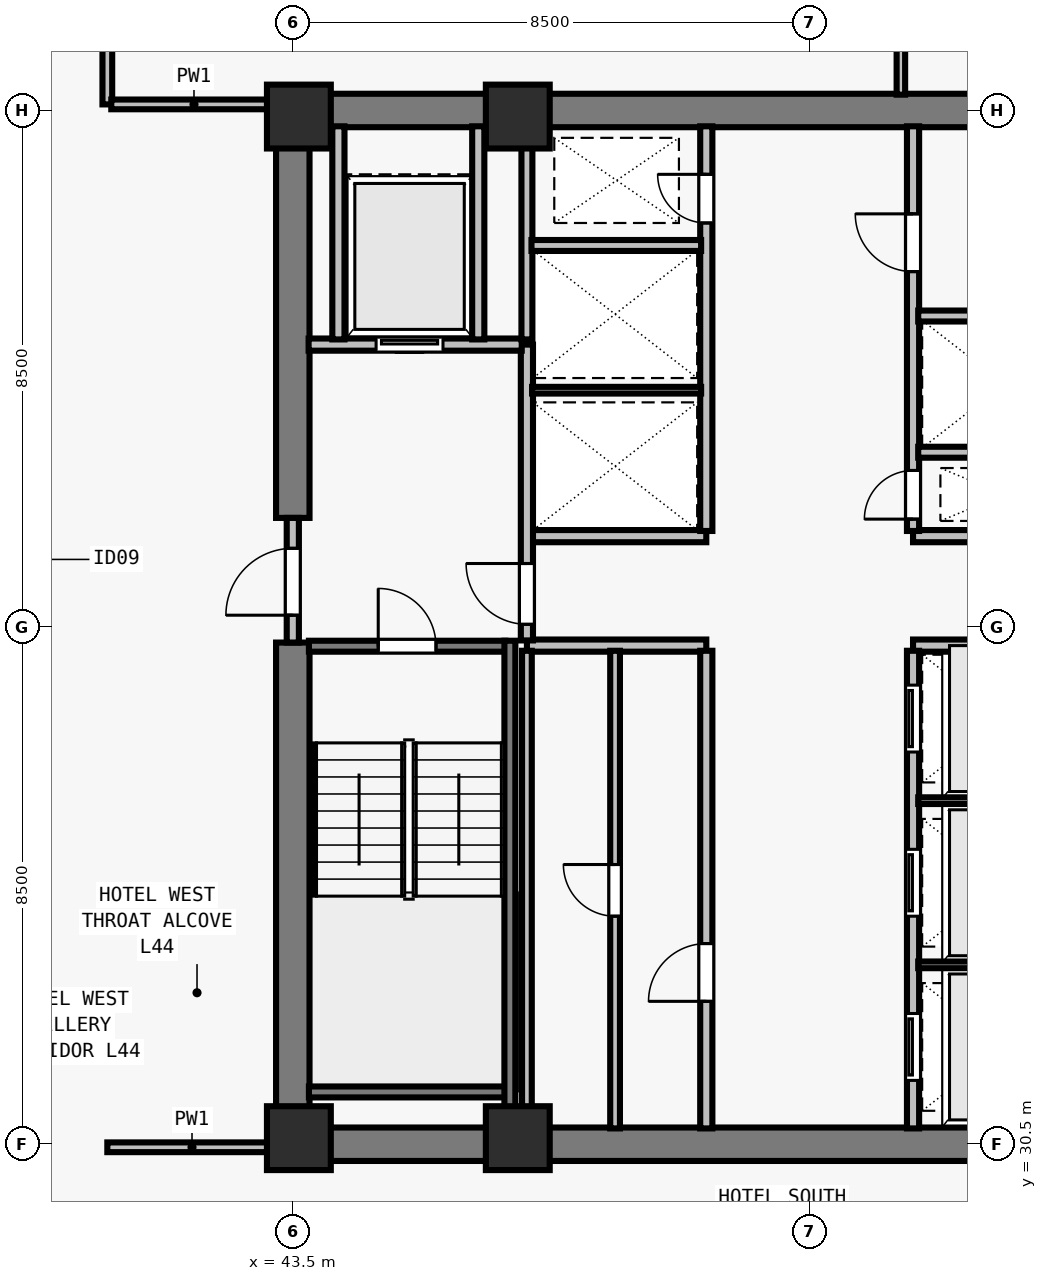
"""IFC4 building model, lengths in metres.
Left out: names, types, materials, properties, quantities, classifications, styles, units other than length and angle.
Written with IfcOpenShell. Run it as: python <this file> out.ifc"""

import sys

from ifc_helpers import new_model, si_unit, direction, frame, frame_2d, origin, origin_2d, place, context, subcontext, project, spatial, rectangle, extrude, element, fill, save


model = new_model("IFC4")
c1 = context("Model", 3, precision=1e-05, world=origin(), true_north=direction((0.0, 1.0)))
c2 = subcontext(c1, "Body", "Model", "MODEL_VIEW")
j1 = project(units=[si_unit("LENGTHUNIT", "METRE"), si_unit("PLANEANGLEUNIT", "RADIAN")], contexts=[c1])
p1 = place(None, origin())
s1 = spatial("IfcSite", under=j1, at=p1, CompositionType="ELEMENT")
p2 = place(p1, origin())
s2 = spatial("IfcBuilding", under=s1, at=p2, CompositionType="ELEMENT")
p3 = place(p2, frame((0.0, 0.0, 162.0)))
s3 = spatial("IfcBuildingStorey", under=s2, at=p3, CompositionType="ELEMENT", Elevation=162.0)
for number, where, z_axis, x_axis in (
    (1, (43.6, 30.6, 0.0), (0.0, 0.0, 1.0), (1.0, 0.0, 0.0)),
    (2, (47.2, 30.6, 0.0), (0.0, 0.0, 1.0), (1.0, 0.0, 0.0)),
    (3, (43.6, 47.4, 0.0), (0.0, 0.0, 1.0), (1.0, 0.0, 0.0)),
    (4, (47.2, 47.4, 0.0), (0.0, 0.0, 1.0), (1.0, 0.0, 0.0)),
):
    element("IfcColumn", number, at=place(p3, frame(where, z_axis=z_axis, x_axis=x_axis)), inside=s3, PredefinedType="COLUMN", context=c2, shape_type="SweptSolid", body=[
        extrude(rectangle(XDim=1.05, YDim=1.05, at=origin_2d()), origin(), (0.0, 0.0, 1.0), 3.5),
    ])
for number, where, z_axis, x_axis in (
    (5, (43.225, 30.5, 0.0), (0.0, 0.0, 1.0), (1.0, 0.0, 0.0)),
    (6, (43.225, 47.5, 0.0), (0.0, 0.0, 1.0), (1.0, 0.0, 0.0)),
):
    element("IfcWall", number, at=place(p3, frame(where, z_axis=z_axis, x_axis=x_axis)), inside=s3, PredefinedType="SHEAR", context=c2, shape_type="SweptSolid", body=[
        extrude(rectangle(XDim=17.55, YDim=0.55, at=frame_2d((8.775, 0.0))), origin(), (0.0, 0.0, 1.0), 3.28),
    ])
p4 = place(p3, frame((43.5, 30.765, 0.0), z_axis=(0.0, 0.0, 1.0), x_axis=(0.0, 1.0, 0.0)))
e7 = element("IfcWall", 7, at=p4, inside=s3, PredefinedType="SHEAR", context=c2, shape_type="SweptSolid", body=[
    extrude(rectangle(XDim=7.985, YDim=0.55, at=frame_2d((3.993, 0.0))), origin(), (0.0, 0.0, 1.0), 3.28),
])
p5 = place(p3, frame((43.5, 40.8, 0.0), z_axis=(0.0, 0.0, 1.0), x_axis=(0.0, 1.0, 0.0)))
e8 = element("IfcWall", 8, at=p5, inside=s3, PredefinedType="SHEAR", context=c2, shape_type="SweptSolid", body=[
    extrude(rectangle(XDim=6.435, YDim=0.55, at=frame_2d((3.218, 0.0))), origin(), (0.0, 0.0, 1.0), 3.28),
])
for number, where, z_axis, x_axis in (
    (9, (47.35, 38.7, 0.0), (0.0, 0.0, 1.0), (1.0, 0.0, 0.0)),
    (10, (47.35, 40.5, 0.0), (0.0, 0.0, 1.0), (1.0, 0.0, 0.0)),
    (11, (53.7, 38.7, 0.0), (0.0, 0.0, 1.0), (1.0, 0.0, 0.0)),
    (12, (53.7, 40.5, 0.0), (0.0, 0.0, 1.0), (1.0, 0.0, 0.0)),
):
    element("IfcWall", number, at=place(p3, frame(where, z_axis=z_axis, x_axis=x_axis)), inside=s3, PredefinedType="SOLIDWALL", context=c2, shape_type="SweptSolid", body=[
        extrude(rectangle(XDim=2.95, YDim=0.2, at=frame_2d((1.475, 0.0))), origin(), (0.0, 0.0, 1.0), 3.28),
    ])
p6 = place(p3, frame((50.3, 30.76, 0.0), z_axis=(0.0, 0.0, 1.0), x_axis=(0.0, 1.0, 0.0)))
e13 = element("IfcWall", 13, at=p6, inside=s3, PredefinedType="SOLIDWALL", context=c2, shape_type="SweptSolid", body=[
    extrude(rectangle(XDim=7.855, YDim=0.2, at=frame_2d((3.927, 0.0))), origin(), (0.0, 0.0, 1.0), 3.28),
])
p7 = place(p6, frame((2.09, 0.0, 0.0)))
e14 = element("IfcOpeningElement", 14, at=p7, cuts=e13, PredefinedType="OPENING", context=c2, shape_type="SweptSolid", body=[
    extrude(rectangle(XDim=0.95, YDim=2.12, at=frame_2d((0.475, 1.06))), frame((0.0, 0.11, 0.0), z_axis=(0.0, -1.0, 0.0), x_axis=(1.0, 0.0, 0.0)), (0.0, 0.0, 1.0), 0.22),
])
p8 = place(p3, frame((53.7, 30.76, 0.0), z_axis=(0.0, 0.0, 1.0), x_axis=(0.0, 1.0, 0.0)))
e15 = element("IfcWall", 15, at=p8, inside=s3, PredefinedType="SOLIDWALL", context=c2, shape_type="SweptSolid", body=[
    extrude(rectangle(XDim=7.855, YDim=0.2, at=frame_2d((3.927, 0.0))), origin(), (0.0, 0.0, 1.0), 3.28),
])
p9 = place(p8, frame((0.79, 0.0, 0.0)))
e16 = element("IfcOpeningElement", 16, at=p9, cuts=e15, PredefinedType="OPENING", context=c2, shape_type="SweptSolid", body=[
    extrude(rectangle(XDim=1.1, YDim=2.2, at=frame_2d((0.55, 1.1))), frame((0.0, 0.11, 0.0), z_axis=(0.0, -1.0, 0.0), x_axis=(1.0, 0.0, 0.0)), (0.0, 0.0, 1.0), 0.22),
])
p10 = place(p8, frame((3.49, 0.0, 0.0)))
e17 = element("IfcOpeningElement", 17, at=p10, cuts=e15, PredefinedType="OPENING", context=c2, shape_type="SweptSolid", body=[
    extrude(rectangle(XDim=1.1, YDim=2.2, at=frame_2d((0.55, 1.1))), frame((0.0, 0.11, 0.0), z_axis=(0.0, -1.0, 0.0), x_axis=(1.0, 0.0, 0.0)), (0.0, 0.0, 1.0), 0.22),
])
p11 = place(p8, frame((6.19, 0.0, 0.0)))
e18 = element("IfcOpeningElement", 18, at=p11, cuts=e15, PredefinedType="OPENING", context=c2, shape_type="SweptSolid", body=[
    extrude(rectangle(XDim=1.1, YDim=2.2, at=frame_2d((0.55, 1.1))), frame((0.0, 0.11, 0.0), z_axis=(0.0, -1.0, 0.0), x_axis=(1.0, 0.0, 0.0)), (0.0, 0.0, 1.0), 0.22),
])
p12 = place(p3, frame((50.3, 40.585, 0.0), z_axis=(0.0, 0.0, 1.0), x_axis=(0.0, 1.0, 0.0)))
e19 = element("IfcWall", 19, at=p12, inside=s3, PredefinedType="SOLIDWALL", context=c2, shape_type="SweptSolid", body=[
    extrude(rectangle(XDim=6.655, YDim=0.2, at=frame_2d((3.328, 0.0))), origin(), (0.0, 0.0, 1.0), 3.28),
])
p13 = place(p12, frame((5.065, 0.0, 0.0)))
e20 = element("IfcOpeningElement", 20, at=p13, cuts=e19, PredefinedType="OPENING", context=c2, shape_type="SweptSolid", body=[
    extrude(rectangle(XDim=0.8, YDim=2.08, at=frame_2d((0.4, 1.04))), frame((0.0, 0.11, 0.0), z_axis=(0.0, -1.0, 0.0), x_axis=(1.0, 0.0, 0.0)), (0.0, 0.0, 1.0), 0.22),
])
p14 = place(p3, frame((53.7, 40.585, 0.0), z_axis=(0.0, 0.0, 1.0), x_axis=(0.0, 1.0, 0.0)))
e21 = element("IfcWall", 21, at=p14, inside=s3, PredefinedType="SOLIDWALL", context=c2, shape_type="SweptSolid", body=[
    extrude(rectangle(XDim=6.655, YDim=0.2, at=frame_2d((3.328, 0.0))), origin(), (0.0, 0.0, 1.0), 3.28),
])
p15 = place(p14, frame((0.195, 0.0, 0.0)))
e22 = element("IfcOpeningElement", 22, at=p15, cuts=e21, PredefinedType="OPENING", context=c2, shape_type="SweptSolid", body=[
    extrude(rectangle(XDim=0.8, YDim=2.08, at=frame_2d((0.4, 1.04))), frame((0.0, 0.11, 0.0), z_axis=(0.0, -1.0, 0.0), x_axis=(1.0, 0.0, 0.0)), (0.0, 0.0, 1.0), 0.22),
])
p16 = place(p14, frame((4.265, 0.0, 0.0)))
e23 = element("IfcOpeningElement", 23, at=p16, cuts=e21, PredefinedType="OPENING", context=c2, shape_type="SweptSolid", body=[
    extrude(rectangle(XDim=0.95, YDim=2.12, at=frame_2d((0.475, 1.06))), frame((0.0, 0.11, 0.0), z_axis=(0.0, -1.0, 0.0), x_axis=(1.0, 0.0, 0.0)), (0.0, 0.0, 1.0), 0.22),
])
p17 = place(p3, frame((43.5, 38.75, 0.0), z_axis=(0.0, 0.0, 1.0), x_axis=(0.0, 1.0, 0.0)))
e24 = element("IfcWall", 24, at=p17, inside=s3, PredefinedType="SOLIDWALL", context=c2, shape_type="SweptSolid", body=[
    extrude(rectangle(XDim=2.05, YDim=0.2, at=frame_2d((1.025, 0.0))), origin(), (0.0, 0.0, 1.0), 3.28),
])
p18 = place(p17, frame((0.45, 0.0, 0.0)))
e25 = element("IfcOpeningElement", 25, at=p18, cuts=e24, PredefinedType="OPENING", context=c2, shape_type="SweptSolid", body=[
    extrude(rectangle(XDim=1.1, YDim=2.15, at=frame_2d((0.55, 1.075))), frame((0.0, 0.11, 0.0), z_axis=(0.0, -1.0, 0.0), x_axis=(1.0, 0.0, 0.0)), (0.0, 0.0, 1.0), 0.22),
])
p19 = place(p3, frame((47.35, 38.785, 0.0), z_axis=(0.0, 0.0, 1.0), x_axis=(0.0, 1.0, 0.0)))
e26 = element("IfcWall", 26, at=p19, inside=s3, PredefinedType="SOLIDWALL", context=c2, shape_type="SweptSolid", body=[
    extrude(rectangle(XDim=4.865, YDim=0.2, at=frame_2d((2.433, 0.0))), origin(), (0.0, 0.0, 1.0), 3.28),
])
p20 = place(p19, frame((0.265, 0.0, 0.0)))
e27 = element("IfcOpeningElement", 27, at=p20, cuts=e26, PredefinedType="OPENING", context=c2, shape_type="SweptSolid", body=[
    extrude(rectangle(XDim=1.0, YDim=2.15, at=frame_2d((0.5, 1.075))), frame((0.0, 0.11, 0.0), z_axis=(0.0, -1.0, 0.0), x_axis=(1.0, 0.0, 0.0)), (0.0, 0.0, 1.0), 0.22),
])
p21 = place(p3, frame((43.76, 43.65, 0.0), z_axis=(0.0, 0.0, 1.0), x_axis=(1.0, 0.0, 0.0)))
e28 = element("IfcWall", 28, at=p21, inside=s3, PredefinedType="SOLIDWALL", context=c2, shape_type="SweptSolid", body=[
    extrude(rectangle(XDim=3.505, YDim=0.2, at=frame_2d((1.752, 0.0))), origin(), (0.0, 0.0, 1.0), 3.28),
])
p22 = place(p21, frame((1.11, 0.0, 0.0)))
e29 = element("IfcOpeningElement", 29, at=p22, cuts=e28, PredefinedType="OPENING", context=c2, shape_type="SweptSolid", body=[
    extrude(rectangle(XDim=1.1, YDim=2.2, at=frame_2d((0.55, 1.1))), frame((0.0, 0.11, 0.0), z_axis=(0.0, -1.0, 0.0), x_axis=(1.0, 0.0, 0.0)), (0.0, 0.0, 1.0), 0.22),
])
for number, where, z_axis, x_axis in (
    (30, (46.55, 43.735, 0.0), (0.0, 0.0, 1.0), (0.0, 1.0, 0.0)),
    (31, (44.25, 43.735, 0.0), (0.0, 0.0, 1.0), (0.0, 1.0, 0.0)),
):
    element("IfcWall", number, at=place(p3, frame(where, z_axis=z_axis, x_axis=x_axis)), inside=s3, PredefinedType="SOLIDWALL", context=c2, shape_type="SweptSolid", body=[
        extrude(rectangle(XDim=3.505, YDim=0.2, at=frame_2d((1.752, 0.0))), origin(), (0.0, 0.0, 1.0), 3.28),
    ])
p23 = place(p3, frame((47.35, 30.76, 0.0), z_axis=(0.0, 0.0, 1.0), x_axis=(0.0, 1.0, 0.0)))
e32 = element("IfcWall", 32, at=p23, inside=s3, PredefinedType="PARTITIONING", context=c2, shape_type="SweptSolid", body=[
    extrude(rectangle(XDim=7.855, YDim=0.16, at=frame_2d((3.927, 0.0))), origin(), (0.0, 0.0, 1.0), 3.28),
])
p24 = place(p3, frame((48.8, 30.76, 0.0), z_axis=(0.0, 0.0, 1.0), x_axis=(0.0, 1.0, 0.0)))
e33 = element("IfcWall", 33, at=p24, inside=s3, PredefinedType="PARTITIONING", context=c2, shape_type="SweptSolid", body=[
    extrude(rectangle(XDim=7.855, YDim=0.16, at=frame_2d((3.927, 0.0))), origin(), (0.0, 0.0, 1.0), 3.28),
])
p25 = place(p24, frame((3.49, 0.0, 0.0)))
e34 = element("IfcOpeningElement", 34, at=p25, cuts=e33, PredefinedType="OPENING", context=c2, shape_type="SweptSolid", body=[
    extrude(rectangle(XDim=0.85, YDim=2.12, at=frame_2d((0.425, 1.06))), frame((0.0, 0.09, 0.0), z_axis=(0.0, -1.0, 0.0), x_axis=(1.0, 0.0, 0.0)), (0.0, 0.0, 1.0), 0.18),
])
for number, where, z_axis, x_axis in (
    (35, (53.785, 33.45, 0.0), (0.0, 0.0, 1.0), (1.0, 0.0, 0.0)),
    (36, (53.785, 36.15, 0.0), (0.0, 0.0, 1.0), (1.0, 0.0, 0.0)),
):
    element("IfcWall", number, at=place(p3, frame(where, z_axis=z_axis, x_axis=x_axis)), inside=s3, PredefinedType="PARTITIONING", context=c2, shape_type="SweptSolid", body=[
        extrude(rectangle(XDim=2.79, YDim=0.11, at=frame_2d((1.395, 0.0))), origin(), (0.0, 0.0, 1.0), 3.28),
    ])
p26 = place(p3, frame((47.35, 43.735, 0.0), z_axis=(0.0, 0.0, 1.0), x_axis=(0.0, 1.0, 0.0)))
e37 = element("IfcWall", 37, at=p26, inside=s3, PredefinedType="SOLIDWALL", context=c2, shape_type="SweptSolid", body=[
    extrude(rectangle(XDim=3.505, YDim=0.18, at=frame_2d((1.752, 0.0))), origin(), (0.0, 0.0, 1.0), 3.28),
])
p27 = place(p3, frame((47.435, 42.9, 0.0), z_axis=(0.0, 0.0, 1.0), x_axis=(1.0, 0.0, 0.0)))
e38 = element("IfcWall", 38, at=p27, inside=s3, PredefinedType="PARTITIONING", context=c2, shape_type="SweptSolid", body=[
    extrude(rectangle(XDim=2.78, YDim=0.11, at=frame_2d((1.39, 0.0))), origin(), (0.0, 0.0, 1.0), 3.28),
])
p28 = place(p3, frame((47.425, 45.28, 0.0), z_axis=(0.0, 0.0, 1.0), x_axis=(1.0, 0.0, 0.0)))
e39 = element("IfcWall", 39, at=p28, inside=s3, PredefinedType="SOLIDWALL", context=c2, shape_type="SweptSolid", body=[
    extrude(rectangle(XDim=2.79, YDim=0.18, at=frame_2d((1.395, 0.0))), origin(), (0.0, 0.0, 1.0), 3.28),
])
p29 = place(p3, frame((53.785, 41.88, 0.0), z_axis=(0.0, 0.0, 1.0), x_axis=(1.0, 0.0, 0.0)))
e40 = element("IfcWall", 40, at=p29, inside=s3, PredefinedType="SOLIDWALL", context=c2, shape_type="SweptSolid", body=[
    extrude(rectangle(XDim=2.78, YDim=0.18, at=frame_2d((1.39, 0.0))), origin(), (0.0, 0.0, 1.0), 3.28),
])
p30 = place(p3, frame((53.785, 44.12, 0.0), z_axis=(0.0, 0.0, 1.0), x_axis=(1.0, 0.0, 0.0)))
e41 = element("IfcWall", 41, at=p30, inside=s3, PredefinedType="SOLIDWALL", context=c2, shape_type="SweptSolid", body=[
    extrude(rectangle(XDim=2.79, YDim=0.18, at=frame_2d((1.395, 0.0))), origin(), (0.0, 0.0, 1.0), 3.28),
])
p31 = place(p3, frame((40.45, 47.6, 0.0), z_axis=(0.0, 0.0, 1.0), x_axis=(0.0, 1.0, 0.0)))
e42 = element("IfcWall", 42, at=p31, inside=s3, PredefinedType="PARTITIONING", context=c2, shape_type="SweptSolid", body=[
    extrude(rectangle(XDim=15.075, YDim=0.16, at=frame_2d((7.538, 0.0))), origin(), (0.0, 0.0, 1.0), 2.555),
])
p32 = place(p31, frame((3.5, 0.0, 0.0)))
e43 = element("IfcOpeningElement", 43, at=p32, cuts=e42, PredefinedType="OPENING", context=c2, shape_type="SweptSolid", body=[
    extrude(rectangle(XDim=0.96, YDim=2.12, at=frame_2d((0.48, 1.06))), frame((0.0, 0.09, 0.0), z_axis=(0.0, -1.0, 0.0), x_axis=(1.0, 0.0, 0.0)), (0.0, 0.0, 1.0), 0.18),
])
p33 = place(p3, frame((40.45, 30.45, 0.0), z_axis=(0.0, 0.0, 1.0), x_axis=(1.0, 0.0, 0.0)))
e44 = element("IfcWall", 44, at=p33, inside=s3, PredefinedType="PARTITIONING", context=c2, shape_type="SweptSolid", body=[
    extrude(rectangle(XDim=2.785, YDim=0.16, at=frame_2d((1.393, 0.0))), origin(), (0.0, 0.0, 1.0), 3.28),
])
p34 = place(p3, frame((40.515, 47.6, 0.0), z_axis=(0.0, 0.0, 1.0), x_axis=(1.0, 0.0, 0.0)))
e45 = element("IfcWall", 45, at=p34, inside=s3, PredefinedType="PARTITIONING", context=c2, shape_type="SweptSolid", body=[
    extrude(rectangle(XDim=2.72, YDim=0.16, at=frame_2d((1.36, 0.0))), origin(), (0.0, 0.0, 1.0), 3.28),
])
p35 = place(p3, frame((53.5, 47.76, 0.0), z_axis=(0.0, 0.0, 1.0), x_axis=(0.0, 1.0, 0.0)))
e46 = element("IfcWall", 46, at=p35, inside=s3, PredefinedType="PARTITIONING", context=c2, shape_type="SweptSolid", body=[
    extrude(rectangle(XDim=14.915, YDim=0.14, at=frame_2d((7.458, 0.0))), origin(), (0.0, 0.0, 1.0), 2.896),
])
p36 = place(p3, frame((43.765, 38.69, 0.0), z_axis=(0.0, 0.0, 1.0), x_axis=(1.0, 0.0, 0.0)))
e47 = element("IfcWall", 47, at=p36, inside=s3, PredefinedType="SOLIDWALL", context=c2, shape_type="SweptSolid", body=[
    extrude(rectangle(XDim=3.23, YDim=0.18, at=frame_2d((1.615, 0.0))), origin(), (0.0, 0.0, 1.0), 3.28),
])
p37 = place(p36, frame((1.14, 0.0, 0.0)))
e48 = element("IfcOpeningElement", 48, at=p37, cuts=e47, PredefinedType="OPENING", context=c2, shape_type="SweptSolid", body=[
    extrude(rectangle(XDim=0.95, YDim=2.15, at=frame_2d((0.475, 1.075))), frame((0.0, 0.1, 0.0), z_axis=(0.0, -1.0, 0.0), x_axis=(1.0, 0.0, 0.0)), (0.0, 0.0, 1.0), 0.2),
])
p38 = place(p3, frame((43.765, 31.36, 0.0), z_axis=(0.0, 0.0, 1.0), x_axis=(1.0, 0.0, 0.0)))
e49 = element("IfcWall", 49, at=p38, inside=s3, PredefinedType="SOLIDWALL", context=c2, shape_type="SweptSolid", body=[
    extrude(rectangle(XDim=3.23, YDim=0.18, at=frame_2d((1.615, 0.0))), origin(), (0.0, 0.0, 1.0), 3.28),
])
p39 = place(p3, frame((47.07, 38.78, 0.0), z_axis=(0.0, 0.0, 1.0), x_axis=(0.0, -1.0, 0.0)))
e50 = element("IfcWall", 50, at=p39, inside=s3, PredefinedType="SOLIDWALL", context=c2, shape_type="SweptSolid", body=[
    extrude(rectangle(XDim=8.017, YDim=0.18, at=frame_2d((4.009, 0.0))), origin(), (0.0, 0.0, 1.0), 3.28),
])
p40 = place(p18, origin())
e51 = element("IfcDoor", 51, at=p40, inside=s3, OperationType="SINGLE_SWING_LEFT", PredefinedType="DOOR", context=c2, shape_type="SweptSolid", body=[
    extrude(rectangle(XDim=1.1, YDim=2.15, at=frame_2d((0.55, 1.075))), frame((0.0, 0.025, 0.0), z_axis=(0.0, -1.0, 0.0), x_axis=(1.0, 0.0, 0.0)), (0.0, 0.0, 1.0), 0.05),
])
fill(e25, e51)
p41 = place(p20, origin())
e52 = element("IfcDoor", 52, at=p41, inside=s3, OperationType="SINGLE_SWING_RIGHT", PredefinedType="DOOR", context=c2, shape_type="SweptSolid", body=[
    extrude(rectangle(XDim=1.0, YDim=2.15, at=frame_2d((0.5, 1.075))), frame((0.0, 0.025, 0.0), z_axis=(0.0, -1.0, 0.0), x_axis=(1.0, 0.0, 0.0)), (0.0, 0.0, 1.0), 0.05),
])
fill(e27, e52)
p42 = place(p22, origin())
e53 = element("IfcDoor", 53, at=p42, inside=s3, OperationType="SLIDING_TO_LEFT", PredefinedType="DOOR", context=c2, shape_type="SweptSolid", body=[
    extrude(rectangle(XDim=1.1, YDim=2.2, at=frame_2d((0.55, 1.1))), frame((0.0, 0.025, 0.0), z_axis=(0.0, -1.0, 0.0), x_axis=(1.0, 0.0, 0.0)), (0.0, 0.0, 1.0), 0.05),
])
fill(e29, e53)
p43 = place(p7, origin())
e54 = element("IfcDoor", 54, at=p43, inside=s3, OperationType="SINGLE_SWING_LEFT", PredefinedType="DOOR", context=c2, shape_type="SweptSolid", body=[
    extrude(rectangle(XDim=0.95, YDim=2.12, at=frame_2d((0.475, 1.06))), frame((0.0, 0.025, 0.0), z_axis=(0.0, -1.0, 0.0), x_axis=(1.0, 0.0, 0.0)), (0.0, 0.0, 1.0), 0.05),
])
fill(e14, e54)
p44 = place(p25, origin())
e55 = element("IfcDoor", 55, at=p44, inside=s3, OperationType="SINGLE_SWING_RIGHT", PredefinedType="DOOR", context=c2, shape_type="SweptSolid", body=[
    extrude(rectangle(XDim=0.85, YDim=2.12, at=frame_2d((0.425, 1.06))), frame((0.0, 0.025, 0.0), z_axis=(0.0, -1.0, 0.0), x_axis=(1.0, 0.0, 0.0)), (0.0, 0.0, 1.0), 0.05),
])
fill(e34, e55)
p45 = place(p9, origin())
e56 = element("IfcDoor", 56, at=p45, inside=s3, OperationType="SLIDING_TO_LEFT", PredefinedType="DOOR", context=c2, shape_type="SweptSolid", body=[
    extrude(rectangle(XDim=1.1, YDim=2.2, at=frame_2d((0.55, 1.1))), frame((0.0, 0.025, 0.0), z_axis=(0.0, -1.0, 0.0), x_axis=(1.0, 0.0, 0.0)), (0.0, 0.0, 1.0), 0.05),
])
fill(e16, e56)
p46 = place(p10, origin())
e57 = element("IfcDoor", 57, at=p46, inside=s3, OperationType="SLIDING_TO_LEFT", PredefinedType="DOOR", context=c2, shape_type="SweptSolid", body=[
    extrude(rectangle(XDim=1.1, YDim=2.2, at=frame_2d((0.55, 1.1))), frame((0.0, 0.025, 0.0), z_axis=(0.0, -1.0, 0.0), x_axis=(1.0, 0.0, 0.0)), (0.0, 0.0, 1.0), 0.05),
])
fill(e17, e57)
p47 = place(p11, origin())
e58 = element("IfcDoor", 58, at=p47, inside=s3, OperationType="SLIDING_TO_LEFT", PredefinedType="DOOR", context=c2, shape_type="SweptSolid", body=[
    extrude(rectangle(XDim=1.1, YDim=2.2, at=frame_2d((0.55, 1.1))), frame((0.0, 0.025, 0.0), z_axis=(0.0, -1.0, 0.0), x_axis=(1.0, 0.0, 0.0)), (0.0, 0.0, 1.0), 0.05),
])
fill(e18, e58)
p48 = place(p13, origin())
e59 = element("IfcDoor", 59, at=p48, inside=s3, OperationType="SINGLE_SWING_RIGHT", PredefinedType="DOOR", context=c2, shape_type="SweptSolid", body=[
    extrude(rectangle(XDim=0.8, YDim=2.08, at=frame_2d((0.4, 1.04))), frame((0.0, 0.025, 0.0), z_axis=(0.0, -1.0, 0.0), x_axis=(1.0, 0.0, 0.0)), (0.0, 0.0, 1.0), 0.05),
])
fill(e20, e59)
p49 = place(p15, origin())
e60 = element("IfcDoor", 60, at=p49, inside=s3, OperationType="SINGLE_SWING_LEFT", PredefinedType="DOOR", context=c2, shape_type="SweptSolid", body=[
    extrude(rectangle(XDim=0.8, YDim=2.08, at=frame_2d((0.4, 1.04))), frame((0.0, 0.025, 0.0), z_axis=(0.0, -1.0, 0.0), x_axis=(1.0, 0.0, 0.0)), (0.0, 0.0, 1.0), 0.05),
])
fill(e22, e60)
p50 = place(p16, origin())
e61 = element("IfcDoor", 61, at=p50, inside=s3, OperationType="SINGLE_SWING_RIGHT", PredefinedType="DOOR", context=c2, shape_type="SweptSolid", body=[
    extrude(rectangle(XDim=0.95, YDim=2.12, at=frame_2d((0.475, 1.06))), frame((0.0, 0.025, 0.0), z_axis=(0.0, -1.0, 0.0), x_axis=(1.0, 0.0, 0.0)), (0.0, 0.0, 1.0), 0.05),
])
fill(e23, e61)
p51 = place(p37, origin())
e62 = element("IfcDoor", 62, at=p51, inside=s3, OperationType="SINGLE_SWING_LEFT", PredefinedType="DOOR", context=c2, shape_type="SweptSolid", body=[
    extrude(rectangle(XDim=0.95, YDim=2.15, at=frame_2d((0.475, 1.075))), frame((0.0, 0.025, 0.0), z_axis=(0.0, -1.0, 0.0), x_axis=(1.0, 0.0, 0.0)), (0.0, 0.0, 1.0), 0.05),
])
fill(e48, e62)
save(model, sys.argv[1])
